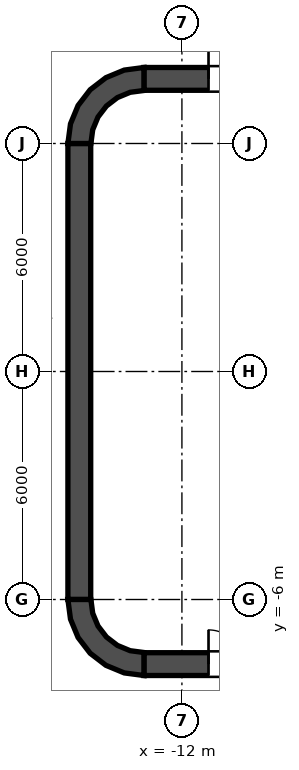
"""IFC4 building model, lengths in metres.
Left out: names, types, materials, properties, quantities, classifications, styles, units other than length and angle.
Written with IfcOpenShell. Run it as: python <this file> out.ifc"""

import sys

from ifc_helpers import new_model, si_unit, direction, frame, frame_2d, origin, place, context, subcontext, project, spatial, polyline, rectangle, outline, extrude, element, fill, save


model = new_model("IFC4")
c1 = context("Model", 3, precision=1e-05, world=origin(), true_north=direction((0.0, 1.0)))
c2 = subcontext(c1, "Body", "Model", "MODEL_VIEW")
j1 = project(units=[si_unit("LENGTHUNIT", "METRE"), si_unit("PLANEANGLEUNIT", "RADIAN")], contexts=[c1])
p1 = place(None, origin())
s1 = spatial("IfcSite", under=j1, at=p1, CompositionType="ELEMENT")
p2 = place(p1, origin())
s2 = spatial("IfcBuilding", under=s1, at=p2, CompositionType="ELEMENT")
p3 = place(p2, frame((0.0, 0.0, 17.0)))
s3 = spatial("IfcBuildingStorey", under=s2, at=p3, CompositionType="ELEMENT", Elevation=17.0)
p4 = place(p3, frame((-13.0, 7.7, 0.0), z_axis=(0.0, 0.0, 1.0), x_axis=(1.0, 0.0, 0.0)))
e1 = element("IfcWall", 1, at=p4, inside=s3, PredefinedType="SHEAR", context=c2, shape_type="SweptSolid", body=[
    extrude(rectangle(XDim=26.0, YDim=0.6, at=frame_2d((13.0, 0.0))), origin(), (0.0, 0.0, 1.0), 9.0),
])
p5 = place(p4, frame((1.7, 0.0, 0.0)))
e2 = element("IfcOpeningElement", 2, at=p5, cuts=e1, PredefinedType="OPENING", context=c2, shape_type="SweptSolid", body=[
    extrude(rectangle(XDim=1.8, YDim=2.1, at=frame_2d((0.9, 1.05))), frame((0.0, 0.3, 0.0), z_axis=(0.0, -1.0, 0.0), x_axis=(1.0, 0.0, 0.0)), (0.0, 0.0, 1.0), 0.6),
])
p6 = place(p4, frame((22.5, 0.0, 0.0)))
e3 = element("IfcOpeningElement", 3, at=p6, cuts=e1, PredefinedType="OPENING", context=c2, shape_type="SweptSolid", body=[
    extrude(rectangle(XDim=1.8, YDim=2.1, at=frame_2d((0.9, 1.05))), frame((0.0, 0.3, 0.0), z_axis=(0.0, -1.0, 0.0), x_axis=(1.0, 0.0, 0.0)), (0.0, 0.0, 1.0), 0.6),
])
p7 = place(p3, frame((-13.0, -7.7, 0.0), z_axis=(0.0, 0.0, 1.0), x_axis=(1.0, 0.0, 0.0)))
e4 = element("IfcWall", 4, at=p7, inside=s3, PredefinedType="SHEAR", context=c2, shape_type="SweptSolid", body=[
    extrude(rectangle(XDim=26.0, YDim=0.6, at=frame_2d((13.0, 0.0))), origin(), (0.0, 0.0, 1.0), 9.0),
])
p8 = place(p7, frame((1.7, 0.0, 0.0)))
e5 = element("IfcOpeningElement", 5, at=p8, cuts=e4, PredefinedType="OPENING", context=c2, shape_type="SweptSolid", body=[
    extrude(rectangle(XDim=1.8, YDim=2.1, at=frame_2d((0.9, 1.05))), frame((0.0, 0.3, 0.0), z_axis=(0.0, -1.0, 0.0), x_axis=(1.0, 0.0, 0.0)), (0.0, 0.0, 1.0), 0.6),
])
p9 = place(p7, frame((22.5, 0.0, 0.0)))
e6 = element("IfcOpeningElement", 6, at=p9, cuts=e4, PredefinedType="OPENING", context=c2, shape_type="SweptSolid", body=[
    extrude(rectangle(XDim=1.8, YDim=2.1, at=frame_2d((0.9, 1.05))), frame((0.0, 0.3, 0.0), z_axis=(0.0, -1.0, 0.0), x_axis=(1.0, 0.0, 0.0)), (0.0, 0.0, 1.0), 0.6),
])
p10 = place(p3, frame((-14.7, -6.0, 0.0), z_axis=(0.0, 0.0, 1.0), x_axis=(0.0, 1.0, 0.0)))
e7 = element("IfcWall", 7, at=p10, inside=s3, PredefinedType="SHEAR", context=c2, shape_type="SweptSolid", body=[
    extrude(rectangle(XDim=12.0, YDim=0.6, at=frame_2d((6.0, 0.0))), origin(), (0.0, 0.0, 1.0), 9.0),
])
p11 = place(p3, origin())
e8 = element("IfcWall", 8, at=p11, inside=s3, PredefinedType="SHEAR", context=c2, shape_type="SweptSolid", body=[
    extrude(outline(polyline([(-15.0, 6.0), (-14.395, 6.0), (-14.347, 6.361), (-14.208, 6.698), (-13.986, 6.986), (-13.698, 7.208), (-13.361, 7.347), (-13.0, 7.395), (-13.0, 8.0), (-13.518, 7.932), (-14.0, 7.732), (-14.414, 7.414), (-14.732, 7.0), (-14.932, 6.518), (-15.0, 6.0)])), origin(), (0.0, 0.0, 1.0), 9.0),
])
e9 = element("IfcWall", 9, at=p11, inside=s3, PredefinedType="SHEAR", context=c2, shape_type="SweptSolid", body=[
    extrude(outline(polyline([(-13.0, -8.0), (-13.0, -7.395), (-13.361, -7.347), (-13.698, -7.208), (-13.986, -6.986), (-14.208, -6.698), (-14.347, -6.361), (-14.395, -6.0), (-15.0, -6.0), (-14.932, -6.518), (-14.732, -7.0), (-14.414, -7.414), (-14.0, -7.732), (-13.518, -7.932), (-13.0, -8.0)])), origin(), (0.0, 0.0, 1.0), 9.0),
])
p12 = place(p3, frame((-11.8, -7.4, 0.0), z_axis=(0.0, 0.0, 1.0), x_axis=(0.0, 1.0, 0.0)))
e10 = element("IfcWall", 10, at=p12, inside=s3, PredefinedType="SOLIDWALL", context=c2, shape_type="SweptSolid", body=[
    extrude(rectangle(XDim=14.8, YDim=0.4, at=frame_2d((7.4, 0.0))), origin(), (0.0, 0.0, 1.0), 8.8),
])
p13 = place(p12, frame((11.2, 0.0, 0.0)))
e11 = element("IfcOpeningElement", 11, at=p13, cuts=e10, PredefinedType="OPENING", context=c2, shape_type="SweptSolid", body=[
    extrude(rectangle(XDim=1.1, YDim=2.1, at=frame_2d((0.55, 1.05))), frame((0.0, 0.2, 0.0), z_axis=(0.0, -1.0, 0.0), x_axis=(1.0, 0.0, 0.0)), (0.0, 0.0, 1.0), 0.4),
])
p14 = place(p12, frame((8.3, 0.0, 0.0)))
e12 = element("IfcOpeningElement", 12, at=p14, cuts=e10, PredefinedType="OPENING", context=c2, shape_type="SweptSolid", body=[
    extrude(rectangle(XDim=1.1, YDim=2.1, at=frame_2d((0.55, 1.05))), frame((0.0, 0.2, 0.0), z_axis=(0.0, -1.0, 0.0), x_axis=(1.0, 0.0, 0.0)), (0.0, 0.0, 1.0), 0.4),
])
p15 = place(p12, frame((5.4, 0.0, 0.0)))
e13 = element("IfcOpeningElement", 13, at=p15, cuts=e10, PredefinedType="OPENING", context=c2, shape_type="SweptSolid", body=[
    extrude(rectangle(XDim=1.1, YDim=2.1, at=frame_2d((0.55, 1.05))), frame((0.0, 0.2, 0.0), z_axis=(0.0, -1.0, 0.0), x_axis=(1.0, 0.0, 0.0)), (0.0, 0.0, 1.0), 0.4),
])
p16 = place(p12, frame((13.552, 0.0, 0.0)))
e14 = element("IfcOpeningElement", 14, at=p16, cuts=e10, PredefinedType="OPENING", context=c2, shape_type="SweptSolid", body=[
    extrude(rectangle(XDim=0.9, YDim=2.1, at=frame_2d((0.45, 1.05))), frame((0.0, 0.2, 0.0), z_axis=(0.0, -1.0, 0.0), x_axis=(1.0, 0.0, 0.0)), (0.0, 0.0, 1.0), 0.4),
])
p17 = place(p12, frame((0.347, 0.0, 0.0)))
e15 = element("IfcOpeningElement", 15, at=p17, cuts=e10, PredefinedType="OPENING", context=c2, shape_type="SweptSolid", body=[
    extrude(rectangle(XDim=0.9, YDim=2.1, at=frame_2d((0.45, 1.05))), frame((0.0, 0.2, 0.0), z_axis=(0.0, -1.0, 0.0), x_axis=(1.0, 0.0, 0.0)), (0.0, 0.0, 1.0), 0.4),
])
e16 = element("IfcWall", 16, at=p11, inside=s3, PredefinedType="SOLIDWALL", context=c2, shape_type="SweptSolid", body=[
    extrude(outline(polyline([(-12.0, -5.925), (-12.0, -5.675), (-14.15, -5.675), (-14.15, -3.025), (-12.0, -3.025), (-12.0, -2.775), (-14.15, -2.775), (-14.15, -0.125), (-12.0, -0.125), (-12.0, 0.125), (-14.15, 0.125), (-14.15, 2.775), (-12.0, 2.775), (-12.0, 3.025), (-14.15, 3.025), (-14.15, 5.675), (-12.0, 5.675), (-12.0, 5.925), (-14.15, 5.925), (-14.4, 5.925), (-14.4, 5.675), (-14.4, 3.025), (-14.4, 2.775), (-14.4, 0.125), (-14.4, -0.125), (-14.4, -2.775), (-14.4, -3.025), (-14.4, -5.675), (-14.4, -5.925), (-14.15, -5.925), (-12.0, -5.925)])), origin(), (0.0, 0.0, 1.0), 8.8),
])
p18 = place(p13, origin())
e17 = element("IfcDoor", 17, at=p18, inside=s3, OperationType="DOUBLE_DOOR_SLIDING", PredefinedType="DOOR", context=c2, shape_type="SweptSolid", body=[
    extrude(rectangle(XDim=1.1, YDim=2.1, at=frame_2d((0.55, 1.05))), frame((0.0, 0.025, 0.0), z_axis=(0.0, -1.0, 0.0), x_axis=(1.0, 0.0, 0.0)), (0.0, 0.0, 1.0), 0.05),
])
fill(e11, e17)
p19 = place(p14, origin())
e18 = element("IfcDoor", 18, at=p19, inside=s3, OperationType="DOUBLE_DOOR_SLIDING", PredefinedType="DOOR", context=c2, shape_type="SweptSolid", body=[
    extrude(rectangle(XDim=1.1, YDim=2.1, at=frame_2d((0.55, 1.05))), frame((0.0, 0.025, 0.0), z_axis=(0.0, -1.0, 0.0), x_axis=(1.0, 0.0, 0.0)), (0.0, 0.0, 1.0), 0.05),
])
fill(e12, e18)
p20 = place(p15, origin())
e19 = element("IfcDoor", 19, at=p20, inside=s3, OperationType="DOUBLE_DOOR_SLIDING", PredefinedType="DOOR", context=c2, shape_type="SweptSolid", body=[
    extrude(rectangle(XDim=1.1, YDim=2.1, at=frame_2d((0.55, 1.05))), frame((0.0, 0.025, 0.0), z_axis=(0.0, -1.0, 0.0), x_axis=(1.0, 0.0, 0.0)), (0.0, 0.0, 1.0), 0.05),
])
fill(e13, e19)
p21 = place(p16, origin())
e20 = element("IfcDoor", 20, at=p21, inside=s3, OperationType="SINGLE_SWING_LEFT", PredefinedType="DOOR", context=c2, shape_type="SweptSolid", body=[
    extrude(rectangle(XDim=0.9, YDim=2.1, at=frame_2d((0.45, 1.05))), frame((0.0, 0.025, 0.0), z_axis=(0.0, -1.0, 0.0), x_axis=(1.0, 0.0, 0.0)), (0.0, 0.0, 1.0), 0.05),
])
fill(e14, e20)
p22 = place(p17, origin())
e21 = element("IfcDoor", 21, at=p22, inside=s3, OperationType="SINGLE_SWING_LEFT", PredefinedType="DOOR", context=c2, shape_type="SweptSolid", body=[
    extrude(rectangle(XDim=0.9, YDim=2.1, at=frame_2d((0.45, 1.05))), frame((0.0, 0.025, 0.0), z_axis=(0.0, -1.0, 0.0), x_axis=(1.0, 0.0, 0.0)), (0.0, 0.0, 1.0), 0.05),
])
fill(e15, e21)
p23 = place(p5, origin())
e22 = element("IfcDoor", 22, at=p23, inside=s3, OperationType="DOUBLE_DOOR_SINGLE_SWING", PredefinedType="DOOR", context=c2, shape_type="SweptSolid", body=[
    extrude(rectangle(XDim=1.8, YDim=2.1, at=frame_2d((0.9, 1.05))), frame((0.0, 0.025, 0.0), z_axis=(0.0, -1.0, 0.0), x_axis=(1.0, 0.0, 0.0)), (0.0, 0.0, 1.0), 0.05),
])
fill(e2, e22)
p24 = place(p8, origin())
e23 = element("IfcDoor", 23, at=p24, inside=s3, OperationType="DOUBLE_DOOR_SINGLE_SWING", PredefinedType="DOOR", context=c2, shape_type="SweptSolid", body=[
    extrude(rectangle(XDim=1.8, YDim=2.1, at=frame_2d((0.9, 1.05))), frame((0.0, 0.025, 0.0), z_axis=(0.0, -1.0, 0.0), x_axis=(1.0, 0.0, 0.0)), (0.0, 0.0, 1.0), 0.05),
])
fill(e5, e23)
save(model, sys.argv[1])
